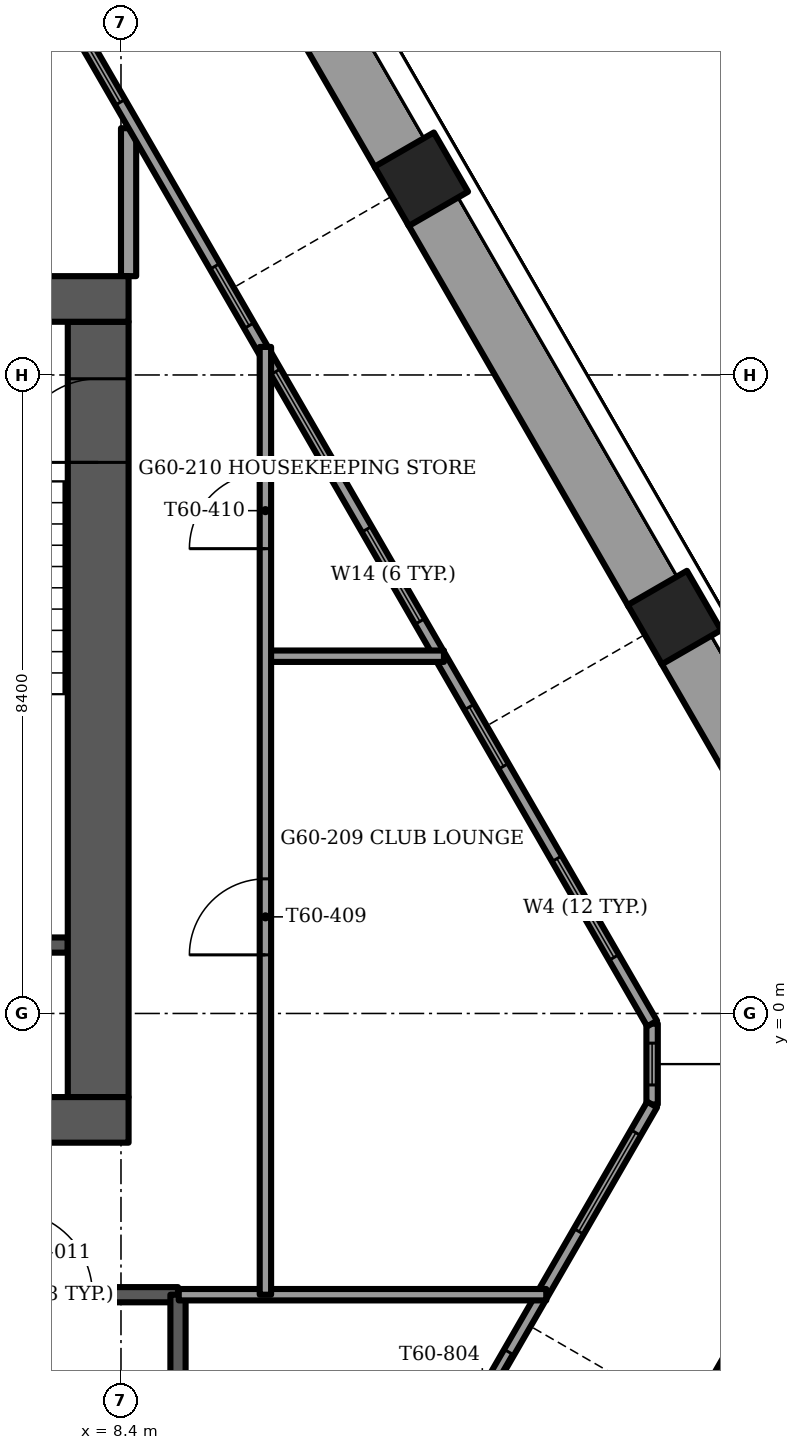
"""IFC4 building model, lengths in metres.
Left out: names, types, materials, properties, quantities, classifications, styles, units other than length and angle.
Written with IfcOpenShell. Run it as: python <this file> out.ifc"""

import sys

from ifc_helpers import new_model, si_unit, direction, frame, frame_2d, origin, origin_2d, place, context, subcontext, project, spatial, rectangle, extrude, element, fill, save


model = new_model("IFC4")
c1 = context("Model", 3, precision=1e-05, world=origin(), true_north=direction((0.0, 1.0)))
c2 = subcontext(c1, "Body", "Model", "MODEL_VIEW")
j1 = project(units=[si_unit("LENGTHUNIT", "METRE"), si_unit("PLANEANGLEUNIT", "RADIAN")], contexts=[c1])
p1 = place(None, origin())
s1 = spatial("IfcSite", under=j1, at=p1, CompositionType="ELEMENT")
p2 = place(p1, origin())
s2 = spatial("IfcBuilding", under=s1, at=p2, CompositionType="ELEMENT")
p3 = place(p2, frame((0.0, 0.0, 245.0)))
s3 = spatial("IfcBuildingStorey", under=s2, at=p3, CompositionType="ELEMENT", Elevation=245.0)
for number, where, z_axis, x_axis in (
    (1, (15.681, 5.209, -1.2), (0.0, 0.0, 1.0), (0.5, -0.866, 0.0)),
    (2, (12.352, 10.976, -1.2), (0.0, 0.0, 1.0), (0.5, -0.866, 0.0)),
):
    element("IfcColumn", number, at=place(p3, frame(where, z_axis=z_axis, x_axis=x_axis)), inside=s3, PredefinedType="COLUMN", context=c2, shape_type="SweptSolid", body=[
        extrude(rectangle(XDim=0.9, YDim=0.9, at=origin_2d()), origin(), (0.0, 0.0, 1.0), 3.75),
    ])
p4 = place(p3, frame((-8.5, -1.4, -0.3), z_axis=(0.0, 0.0, 1.0), x_axis=(1.0, 0.0, 0.0)))
e3 = element("IfcWall", 3, at=p4, inside=s3, PredefinedType="SHEAR", context=c2, shape_type="SweptSolid", body=[
    extrude(rectangle(XDim=17.0, YDim=0.6, at=frame_2d((8.5, 0.0))), origin(), (0.0, 0.0, 1.0), 3.75),
])
p5 = place(p4, frame((7.7, 0.0, 0.0)))
e4 = element("IfcOpeningElement", 4, at=p5, cuts=e3, PredefinedType="OPENING", context=c2, shape_type="SweptSolid", body=[
    extrude(rectangle(XDim=1.6, YDim=2.1, at=frame_2d((0.8, 1.05))), frame((0.0, 0.3, 0.0), z_axis=(0.0, -1.0, 0.0), x_axis=(1.0, 0.0, 0.0)), (0.0, 0.0, 1.0), 0.6),
])
p6 = place(p3, frame((-8.5, 9.4, -0.3), z_axis=(0.0, 0.0, 1.0), x_axis=(1.0, 0.0, 0.0)))
e5 = element("IfcWall", 5, at=p6, inside=s3, PredefinedType="SHEAR", context=c2, shape_type="SweptSolid", body=[
    extrude(rectangle(XDim=17.0, YDim=0.6, at=frame_2d((8.5, 0.0))), origin(), (0.0, 0.0, 1.0), 3.75),
])
p7 = place(p6, frame((7.7, 0.0, 0.0)))
e6 = element("IfcOpeningElement", 6, at=p7, cuts=e5, PredefinedType="OPENING", context=c2, shape_type="SweptSolid", body=[
    extrude(rectangle(XDim=1.6, YDim=2.1, at=frame_2d((0.8, 1.05))), frame((0.0, 0.3, 0.0), z_axis=(0.0, -1.0, 0.0), x_axis=(1.0, 0.0, 0.0)), (0.0, 0.0, 1.0), 0.6),
])
p8 = place(p6, frame((1.75, 0.0, 0.0)))
e7 = element("IfcOpeningElement", 7, at=p8, cuts=e5, PredefinedType="OPENING", context=c2, shape_type="SweptSolid", body=[
    extrude(rectangle(XDim=1.1, YDim=2.1, at=frame_2d((0.55, 1.05))), frame((0.0, 0.3, 0.0), z_axis=(0.0, -1.0, 0.0), x_axis=(1.0, 0.0, 0.0)), (0.0, 0.0, 1.0), 0.6),
])
p9 = place(p6, frame((14.15, 0.0, 0.0)))
e8 = element("IfcOpeningElement", 8, at=p9, cuts=e5, PredefinedType="OPENING", context=c2, shape_type="SweptSolid", body=[
    extrude(rectangle(XDim=1.1, YDim=2.1, at=frame_2d((0.55, 1.05))), frame((0.0, 0.3, 0.0), z_axis=(0.0, -1.0, 0.0), x_axis=(1.0, 0.0, 0.0)), (0.0, 0.0, 1.0), 0.6),
])
p10 = place(p3, frame((8.1, -1.1, -0.3), z_axis=(0.0, 0.0, 1.0), x_axis=(0.0, 1.0, 0.0)))
e9 = element("IfcWall", 9, at=p10, inside=s3, PredefinedType="SHEAR", context=c2, shape_type="SweptSolid", body=[
    extrude(rectangle(XDim=10.2, YDim=0.8, at=frame_2d((5.1, 0.0))), origin(), (0.0, 0.0, 1.0), 3.75),
])
p11 = place(p10, frame((8.35, 0.0, 0.0)))
e10 = element("IfcOpeningElement", 10, at=p11, cuts=e9, PredefinedType="OPENING", context=c2, shape_type="SweptSolid", body=[
    extrude(rectangle(XDim=1.1, YDim=2.1, at=frame_2d((0.55, 1.05))), frame((0.0, 0.4, 0.0), z_axis=(0.0, -1.0, 0.0), x_axis=(1.0, 0.0, 0.0)), (0.0, 0.0, 1.0), 0.8),
])
p12 = place(p3, frame((16.467, -5.178, 0.0), z_axis=(0.0, 0.0, 1.0), x_axis=(0.499980471007, 0.86603667856, 0.0)))
e11 = element("IfcWall", 11, at=p12, inside=s3, PredefinedType="PARAPET", context=c2, shape_type="SweptSolid", body=[
    extrude(rectangle(XDim=4.723, YDim=0.9, at=frame_2d((2.362, 0.0))), origin(), (0.0, 0.0, 1.0), 1.1),
])
p13 = place(p3, frame((18.829, -0.244, 0.0), z_axis=(0.0, 0.0, 1.0), x_axis=(-0.499990994059, 0.866030603304, 0.0)))
e12 = element("IfcWall", 12, at=p13, inside=s3, PredefinedType="PARAPET", context=c2, shape_type="SweptSolid", body=[
    extrude(rectangle(XDim=5.876, YDim=0.9, at=frame_2d((2.938, 0.0))), origin(), (0.0, 0.0, 1.0), 1.1),
])
p14 = place(p3, frame((15.471, 5.573, 0.0), z_axis=(0.0, 0.0, 1.0), x_axis=(-0.499997265274, 0.866026982673, 0.0)))
e13 = element("IfcWall", 13, at=p14, inside=s3, PredefinedType="PARAPET", context=c2, shape_type="SweptSolid", body=[
    extrude(rectangle(XDim=5.819, YDim=0.9, at=frame_2d((2.909, 0.0))), origin(), (0.0, 0.0, 1.0), 1.1),
])
p15 = place(p3, frame((12.142, 11.339, 0.0), z_axis=(0.0, 0.0, 1.0), x_axis=(-0.500008985279, 0.866020216069, 0.0)))
e14 = element("IfcWall", 14, at=p15, inside=s3, PredefinedType="PARAPET", context=c2, shape_type="SweptSolid", body=[
    extrude(rectangle(XDim=5.876, YDim=0.9, at=frame_2d((2.938, 0.0))), origin(), (0.0, 0.0, 1.0), 1.1),
])
p16 = place(p3, frame((8.731, -12.727, 0.0), z_axis=(0.0, 0.0, 1.0), x_axis=(0.499997087355, 0.866027085394, 0.0)))
e15 = element("IfcWall", 15, at=p16, inside=s3, PredefinedType="SOLIDWALL", context=c2, shape_type="SweptSolid", body=[
    extrude(rectangle(XDim=13.312, YDim=0.15, at=frame_2d((6.656, 0.0))), origin(), (0.0, 0.0, 1.0), 3.45),
])
p17 = place(p16, frame((2.756, 0.0, 0.15)))
e16 = element("IfcOpeningElement", 16, at=p17, cuts=e15, PredefinedType="OPENING", context=c2, shape_type="SweptSolid", body=[
    extrude(rectangle(XDim=1.5, YDim=2.85, at=frame_2d((0.75, 1.425))), frame((0.0, 0.075, 0.0), z_axis=(0.0, -1.0, 0.0), x_axis=(1.0, 0.0, 0.0)), (0.0, 0.0, 1.0), 0.15),
])
p18 = place(p16, frame((4.956, 0.0, 0.0)))
e17 = element("IfcOpeningElement", 17, at=p18, cuts=e15, PredefinedType="OPENING", context=c2, shape_type="SweptSolid", body=[
    extrude(rectangle(XDim=1.4, YDim=2.4, at=frame_2d((0.7, 1.2))), frame((0.0, 0.075, 0.0), z_axis=(0.0, -1.0, 0.0), x_axis=(1.0, 0.0, 0.0)), (0.0, 0.0, 1.0), 0.15),
])
p19 = place(p16, frame((6.956, 0.0, 0.15)))
e18 = element("IfcOpeningElement", 18, at=p19, cuts=e15, PredefinedType="OPENING", context=c2, shape_type="SweptSolid", body=[
    extrude(rectangle(XDim=0.9, YDim=2.85, at=frame_2d((0.45, 1.425))), frame((0.0, 0.075, 0.0), z_axis=(0.0, -1.0, 0.0), x_axis=(1.0, 0.0, 0.0)), (0.0, 0.0, 1.0), 0.15),
])
p20 = place(p16, frame((8.149, 0.0, 0.0)))
e19 = element("IfcOpeningElement", 19, at=p20, cuts=e15, PredefinedType="OPENING", context=c2, shape_type="SweptSolid", body=[
    extrude(rectangle(XDim=1.4, YDim=2.4, at=frame_2d((0.7, 1.2))), frame((0.0, 0.075, 0.0), z_axis=(0.0, -1.0, 0.0), x_axis=(1.0, 0.0, 0.0)), (0.0, 0.0, 1.0), 0.15),
])
p21 = place(p16, frame((11.385, 0.0, 0.15)))
e20 = element("IfcOpeningElement", 20, at=p21, cuts=e15, PredefinedType="OPENING", context=c2, shape_type="SweptSolid", body=[
    extrude(rectangle(XDim=1.5, YDim=2.73, at=frame_2d((0.75, 1.365))), frame((0.0, 0.075, 0.0), z_axis=(0.0, -1.0, 0.0), x_axis=(1.0, 0.0, 0.0)), (0.0, 0.0, 1.0), 0.15),
])
p22 = place(p3, frame((15.387, -0.133, 0.0), z_axis=(0.0, 0.0, 1.0), x_axis=(-0.499998651697, 0.866026182226, 0.0)))
e21 = element("IfcWall", 21, at=p22, inside=s3, PredefinedType="SOLIDWALL", context=c2, shape_type="SweptSolid", body=[
    extrude(rectangle(XDim=18.389, YDim=0.15, at=frame_2d((9.195, 0.0))), origin(), (0.0, 0.0, 1.0), 3.45),
])
p23 = place(p22, frame((3.909, 0.0, 0.15)))
e22 = element("IfcOpeningElement", 22, at=p23, cuts=e21, PredefinedType="OPENING", context=c2, shape_type="SweptSolid", body=[
    extrude(rectangle(XDim=0.9, YDim=2.85, at=frame_2d((0.45, 1.425))), frame((0.0, 0.075, 0.0), z_axis=(0.0, -1.0, 0.0), x_axis=(1.0, 0.0, 0.0)), (0.0, 0.0, 1.0), 0.15),
])
p24 = place(p22, frame((6.109, 0.0, 0.15)))
e23 = element("IfcOpeningElement", 23, at=p24, cuts=e21, PredefinedType="OPENING", context=c2, shape_type="SweptSolid", body=[
    extrude(rectangle(XDim=1.4, YDim=2.85, at=frame_2d((0.7, 1.425))), frame((0.0, 0.075, 0.0), z_axis=(0.0, -1.0, 0.0), x_axis=(1.0, 0.0, 0.0)), (0.0, 0.0, 1.0), 0.15),
])
p25 = place(p22, frame((10.603, 0.0, 0.15)))
e24 = element("IfcOpeningElement", 24, at=p25, cuts=e21, PredefinedType="OPENING", context=c2, shape_type="SweptSolid", body=[
    extrude(rectangle(XDim=0.9, YDim=2.85, at=frame_2d((0.45, 1.425))), frame((0.0, 0.075, 0.0), z_axis=(0.0, -1.0, 0.0), x_axis=(1.0, 0.0, 0.0)), (0.0, 0.0, 1.0), 0.15),
])
p26 = place(p22, frame((8.503, 0.0, 0.15)))
e25 = element("IfcOpeningElement", 25, at=p26, cuts=e21, PredefinedType="OPENING", context=c2, shape_type="SweptSolid", body=[
    extrude(rectangle(XDim=1.4, YDim=2.85, at=frame_2d((0.7, 1.425))), frame((0.0, 0.075, 0.0), z_axis=(0.0, -1.0, 0.0), x_axis=(1.0, 0.0, 0.0)), (0.0, 0.0, 1.0), 0.15),
])
p27 = place(p22, frame((13.996, 0.0, 0.15)))
e26 = element("IfcOpeningElement", 26, at=p27, cuts=e21, PredefinedType="OPENING", context=c2, shape_type="SweptSolid", body=[
    extrude(rectangle(XDim=1.5, YDim=2.85, at=frame_2d((0.75, 1.425))), frame((0.0, 0.075, 0.0), z_axis=(0.0, -1.0, 0.0), x_axis=(1.0, 0.0, 0.0)), (0.0, 0.0, 1.0), 0.15),
])
p28 = place(p22, frame((1.004, 0.0, 0.15)))
e27 = element("IfcOpeningElement", 27, at=p28, cuts=e21, PredefinedType="OPENING", context=c2, shape_type="SweptSolid", body=[
    extrude(rectangle(XDim=1.5, YDim=2.73, at=frame_2d((0.75, 1.365))), frame((0.0, 0.075, 0.0), z_axis=(0.0, -1.0, 0.0), x_axis=(1.0, 0.0, 0.0)), (0.0, 0.0, 1.0), 0.15),
])
p29 = place(p22, frame((16.599, 0.0, 0.15)))
e28 = element("IfcOpeningElement", 28, at=p29, cuts=e21, PredefinedType="OPENING", context=c2, shape_type="SweptSolid", body=[
    extrude(rectangle(XDim=1.5, YDim=2.73, at=frame_2d((0.75, 1.365))), frame((0.0, 0.075, 0.0), z_axis=(0.0, -1.0, 0.0), x_axis=(1.0, 0.0, 0.0)), (0.0, 0.0, 1.0), 0.15),
])
p30 = place(p3, frame((15.387, -1.198, 0.0), z_axis=(0.0, 0.0, 1.0), x_axis=(0.0, 1.0, 0.0)))
e29 = element("IfcWall", 29, at=p30, inside=s3, PredefinedType="SOLIDWALL", context=c2, shape_type="SweptSolid", body=[
    extrude(rectangle(XDim=1.065, YDim=0.15, at=frame_2d((0.532, 0.0))), origin(), (0.0, 0.0, 1.0), 3.45),
])
p31 = place(p30, frame((0.258, 0.0, 0.15)))
e30 = element("IfcOpeningElement", 30, at=p31, cuts=e29, PredefinedType="OPENING", context=c2, shape_type="SweptSolid", body=[
    extrude(rectangle(XDim=0.55, YDim=2.85, at=frame_2d((0.275, 1.425))), frame((0.0, 0.075, 0.0), z_axis=(0.0, -1.0, 0.0), x_axis=(1.0, 0.0, 0.0)), (0.0, 0.0, 1.0), 0.15),
])
p32 = place(p3, frame((4.45, 0.9, -0.3), z_axis=(0.0, 0.0, 1.0), x_axis=(1.0, 0.0, 0.0)))
e31 = element("IfcWall", 31, at=p32, inside=s3, PredefinedType="SOLIDWALL", context=c2, shape_type="SweptSolid", body=[
    extrude(rectangle(XDim=3.25, YDim=0.2, at=frame_2d((1.625, 0.0))), origin(), (0.0, 0.0, 1.0), 3.75),
])
p33 = place(p3, frame((5.8, -3.7, -0.3), z_axis=(0.0, 0.0, 1.0), x_axis=(1.0, 0.0, 0.0)))
e32 = element("IfcWall", 32, at=p33, inside=s3, PredefinedType="SOLIDWALL", context=c2, shape_type="SweptSolid", body=[
    extrude(rectangle(XDim=3.35, YDim=0.2, at=frame_2d((1.675, 0.0))), origin(), (0.0, 0.0, 1.0), 3.75),
])
p34 = place(p33, frame((1.125, 0.0, 0.0)))
e33 = element("IfcOpeningElement", 33, at=p34, cuts=e32, PredefinedType="OPENING", context=c2, shape_type="SweptSolid", body=[
    extrude(rectangle(XDim=1.1, YDim=2.1, at=frame_2d((0.55, 1.05))), frame((0.0, 0.1, 0.0), z_axis=(0.0, -1.0, 0.0), x_axis=(1.0, 0.0, 0.0)), (0.0, 0.0, 1.0), 0.2),
])
p35 = place(p3, frame((9.15, -3.7, -0.3), z_axis=(0.0, 0.0, 1.0), x_axis=(0.0, -1.0, 0.0)))
e34 = element("IfcWall", 34, at=p35, inside=s3, PredefinedType="SOLIDWALL", context=c2, shape_type="SweptSolid", body=[
    extrude(rectangle(XDim=7.7, YDim=0.2, at=frame_2d((3.85, 0.0))), origin(), (0.0, 0.0, 1.0), 3.75),
])
p36 = place(p3, frame((8.5, 9.7, 0.0), z_axis=(0.0, 0.0, 1.0), x_axis=(0.0, 1.0, 0.0)))
e35 = element("IfcWall", 35, at=p36, inside=s3, PredefinedType="PARTITIONING", context=c2, shape_type="SweptSolid", body=[
    extrude(rectangle(XDim=1.947, YDim=0.2, at=frame_2d((0.973, 0.0))), origin(), (0.0, 0.0, 1.0), 3.45),
])
p37 = place(p3, frame((9.16, -3.7, 0.0), z_axis=(0.0, 0.0, 1.0), x_axis=(1.0, 0.0, 0.0)))
e36 = element("IfcWall", 36, at=p37, inside=s3, PredefinedType="PARTITIONING", context=c2, shape_type="SweptSolid", body=[
    extrude(rectangle(XDim=4.835, YDim=0.15, at=frame_2d((2.417, 0.0))), origin(), (0.0, 0.0, 1.0), 3.45),
])
p38 = place(p3, frame((10.3, 4.7, 0.0), z_axis=(0.0, 0.0, 1.0), x_axis=(1.0, 0.0, 0.0)))
e37 = element("IfcWall", 37, at=p38, inside=s3, PredefinedType="PARTITIONING", context=c2, shape_type="SweptSolid", body=[
    extrude(rectangle(XDim=2.349, YDim=0.15, at=frame_2d((1.174, 0.0))), origin(), (0.0, 0.0, 1.0), 3.45),
])
p39 = place(p3, frame((10.3, -3.7, 0.0), z_axis=(0.0, 0.0, 1.0), x_axis=(0.0, 1.0, 0.0)))
e38 = element("IfcWall", 38, at=p39, inside=s3, PredefinedType="PARTITIONING", context=c2, shape_type="SweptSolid", body=[
    extrude(rectangle(XDim=12.469, YDim=0.15, at=frame_2d((6.234, 0.0))), origin(), (0.0, 0.0, 1.0), 3.45),
])
p40 = place(p39, frame((4.471, 0.0, 0.0)))
e39 = element("IfcOpeningElement", 39, at=p40, cuts=e38, PredefinedType="OPENING", context=c2, shape_type="SweptSolid", body=[
    extrude(rectangle(XDim=1.0, YDim=2.1, at=frame_2d((0.5, 1.05))), frame((0.0, 0.075, 0.0), z_axis=(0.0, -1.0, 0.0), x_axis=(1.0, 0.0, 0.0)), (0.0, 0.0, 1.0), 0.15),
])
p41 = place(p39, frame((9.815, 0.0, 0.0)))
e40 = element("IfcOpeningElement", 40, at=p41, cuts=e38, PredefinedType="OPENING", context=c2, shape_type="SweptSolid", body=[
    extrude(rectangle(XDim=1.0, YDim=2.1, at=frame_2d((0.5, 1.05))), frame((0.0, 0.075, 0.0), z_axis=(0.0, -1.0, 0.0), x_axis=(1.0, 0.0, 0.0)), (0.0, 0.0, 1.0), 0.15),
])
p42 = place(p20, origin())
e41 = element("IfcDoor", 41, at=p42, inside=s3, OperationType="SLIDING_TO_RIGHT", PredefinedType="DOOR", context=c2, shape_type="SweptSolid", body=[
    extrude(rectangle(XDim=1.4, YDim=2.4, at=frame_2d((0.7, 1.2))), frame((0.0, 0.025, 0.0), z_axis=(0.0, -1.0, 0.0), x_axis=(1.0, 0.0, 0.0)), (0.0, 0.0, 1.0), 0.05),
])
fill(e19, e41)
p43 = place(p21, origin())
e42 = element("IfcWindow", 42, at=p43, inside=s3, PartitioningType="SINGLE_PANEL", PredefinedType="WINDOW", context=c2, shape_type="SweptSolid", body=[
    extrude(rectangle(XDim=1.5, YDim=2.73, at=frame_2d((0.75, 1.365))), frame((0.0, 0.03, 0.0), z_axis=(0.0, -1.0, 0.0), x_axis=(1.0, 0.0, 0.0)), (0.0, 0.0, 1.0), 0.06),
])
fill(e20, e42)
p44 = place(p23, origin())
e43 = element("IfcWindow", 43, at=p44, inside=s3, PartitioningType="SINGLE_PANEL", PredefinedType="WINDOW", context=c2, shape_type="SweptSolid", body=[
    extrude(rectangle(XDim=0.9, YDim=2.85, at=frame_2d((0.45, 1.425))), frame((0.0, 0.03, 0.0), z_axis=(0.0, -1.0, 0.0), x_axis=(1.0, 0.0, 0.0)), (0.0, 0.0, 1.0), 0.06),
])
fill(e22, e43)
p45 = place(p24, origin())
e44 = element("IfcWindow", 44, at=p45, inside=s3, PartitioningType="SINGLE_PANEL", PredefinedType="WINDOW", context=c2, shape_type="SweptSolid", body=[
    extrude(rectangle(XDim=1.4, YDim=2.85, at=frame_2d((0.7, 1.425))), frame((0.0, 0.03, 0.0), z_axis=(0.0, -1.0, 0.0), x_axis=(1.0, 0.0, 0.0)), (0.0, 0.0, 1.0), 0.06),
])
fill(e23, e44)
p46 = place(p25, origin())
e45 = element("IfcWindow", 45, at=p46, inside=s3, PartitioningType="SINGLE_PANEL", PredefinedType="WINDOW", context=c2, shape_type="SweptSolid", body=[
    extrude(rectangle(XDim=0.9, YDim=2.85, at=frame_2d((0.45, 1.425))), frame((0.0, 0.03, 0.0), z_axis=(0.0, -1.0, 0.0), x_axis=(1.0, 0.0, 0.0)), (0.0, 0.0, 1.0), 0.06),
])
fill(e24, e45)
p47 = place(p26, origin())
e46 = element("IfcWindow", 46, at=p47, inside=s3, PartitioningType="SINGLE_PANEL", PredefinedType="WINDOW", context=c2, shape_type="SweptSolid", body=[
    extrude(rectangle(XDim=1.4, YDim=2.85, at=frame_2d((0.7, 1.425))), frame((0.0, 0.03, 0.0), z_axis=(0.0, -1.0, 0.0), x_axis=(1.0, 0.0, 0.0)), (0.0, 0.0, 1.0), 0.06),
])
fill(e25, e46)
p48 = place(p27, origin())
e47 = element("IfcWindow", 47, at=p48, inside=s3, PartitioningType="SINGLE_PANEL", PredefinedType="WINDOW", context=c2, shape_type="SweptSolid", body=[
    extrude(rectangle(XDim=1.5, YDim=2.85, at=frame_2d((0.75, 1.425))), frame((0.0, 0.03, 0.0), z_axis=(0.0, -1.0, 0.0), x_axis=(1.0, 0.0, 0.0)), (0.0, 0.0, 1.0), 0.06),
])
fill(e26, e47)
p49 = place(p28, origin())
e48 = element("IfcWindow", 48, at=p49, inside=s3, PartitioningType="SINGLE_PANEL", PredefinedType="WINDOW", context=c2, shape_type="SweptSolid", body=[
    extrude(rectangle(XDim=1.5, YDim=2.73, at=frame_2d((0.75, 1.365))), frame((0.0, 0.03, 0.0), z_axis=(0.0, -1.0, 0.0), x_axis=(1.0, 0.0, 0.0)), (0.0, 0.0, 1.0), 0.06),
])
fill(e27, e48)
p50 = place(p31, origin())
e49 = element("IfcWindow", 49, at=p50, inside=s3, PartitioningType="SINGLE_PANEL", PredefinedType="WINDOW", context=c2, shape_type="SweptSolid", body=[
    extrude(rectangle(XDim=0.55, YDim=2.85, at=frame_2d((0.275, 1.425))), frame((0.0, 0.03, 0.0), z_axis=(0.0, -1.0, 0.0), x_axis=(1.0, 0.0, 0.0)), (0.0, 0.0, 1.0), 0.06),
])
fill(e30, e49)
p51 = place(p11, origin())
e50 = element("IfcDoor", 50, at=p51, inside=s3, OperationType="SINGLE_SWING_LEFT", PredefinedType="DOOR", context=c2, shape_type="SweptSolid", body=[
    extrude(rectangle(XDim=1.1, YDim=2.1, at=frame_2d((0.55, 1.05))), frame((0.0, 0.025, 0.0), z_axis=(0.0, -1.0, 0.0), x_axis=(1.0, 0.0, 0.0)), (0.0, 0.0, 1.0), 0.05),
])
fill(e10, e50)
p52 = place(p34, origin())
e51 = element("IfcDoor", 51, at=p52, inside=s3, OperationType="SINGLE_SWING_LEFT", PredefinedType="DOOR", context=c2, shape_type="SweptSolid", body=[
    extrude(rectangle(XDim=1.1, YDim=2.1, at=frame_2d((0.55, 1.05))), frame((0.0, 0.025, 0.0), z_axis=(0.0, -1.0, 0.0), x_axis=(1.0, 0.0, 0.0)), (0.0, 0.0, 1.0), 0.05),
])
fill(e33, e51)
p53 = place(p40, origin())
e52 = element("IfcDoor", 52, at=p53, inside=s3, OperationType="SINGLE_SWING_LEFT", PredefinedType="DOOR", context=c2, shape_type="SweptSolid", body=[
    extrude(rectangle(XDim=1.0, YDim=2.1, at=frame_2d((0.5, 1.05))), frame((0.0, 0.025, 0.0), z_axis=(0.0, -1.0, 0.0), x_axis=(1.0, 0.0, 0.0)), (0.0, 0.0, 1.0), 0.05),
])
fill(e39, e52)
p54 = place(p41, origin())
e53 = element("IfcDoor", 53, at=p54, inside=s3, OperationType="SINGLE_SWING_LEFT", PredefinedType="DOOR", context=c2, shape_type="SweptSolid", body=[
    extrude(rectangle(XDim=1.0, YDim=2.1, at=frame_2d((0.5, 1.05))), frame((0.0, 0.025, 0.0), z_axis=(0.0, -1.0, 0.0), x_axis=(1.0, 0.0, 0.0)), (0.0, 0.0, 1.0), 0.05),
])
fill(e40, e53)
save(model, sys.argv[1])
